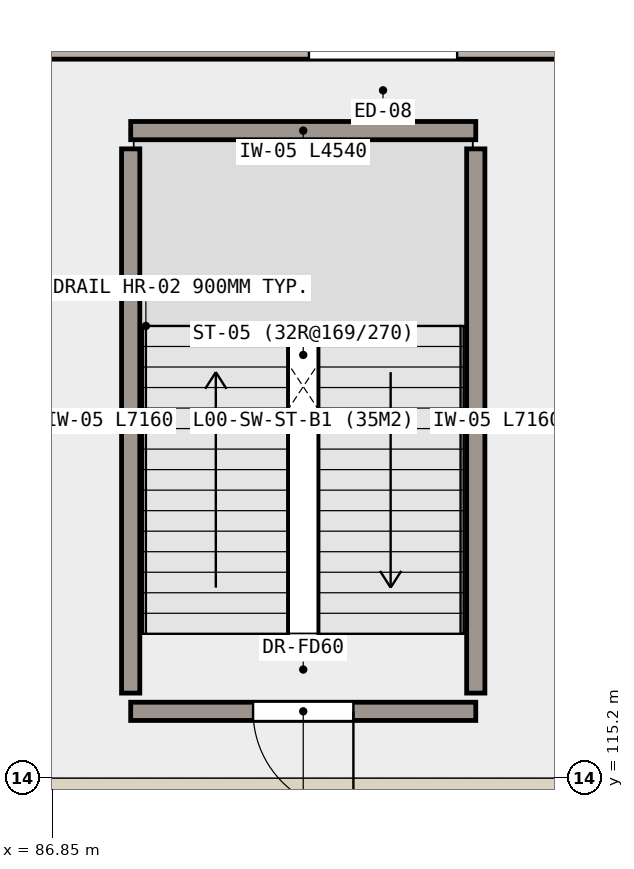
"""IFC4 building model, lengths in metres.
Left out: names, types, materials, properties, quantities, classifications, styles, units other than length and angle.
Written with IfcOpenShell. Run it as: python <this file> out.ifc"""

import sys

from ifc_helpers import new_model, si_unit, direction, frame, frame_2d, origin, place, context, subcontext, project, spatial, rectangle, extrude, element, fill, save


model = new_model("IFC4")
c1 = context("Model", 3, precision=1e-05, world=origin(), true_north=direction((0.0, 1.0)))
c2 = subcontext(c1, "Body", "Model", "MODEL_VIEW")
j1 = project(units=[si_unit("LENGTHUNIT", "METRE"), si_unit("PLANEANGLEUNIT", "RADIAN")], contexts=[c1])
p1 = place(None, origin())
s1 = spatial("IfcSite", under=j1, at=p1, CompositionType="ELEMENT")
p2 = place(p1, origin())
s2 = spatial("IfcBuilding", under=s1, at=p2, CompositionType="ELEMENT")
p3 = place(p2, origin())
s3 = spatial("IfcBuildingStorey", under=s2, at=p3, CompositionType="ELEMENT", Elevation=0.0)
p4 = place(p3, frame((86.65, 124.8, 0.0), z_axis=(0.0, 0.0, 1.0), x_axis=(1.0, 0.0, 0.0)))
e1 = element("IfcWall", 1, at=p4, inside=s3, PredefinedType="SOLIDWALL", context=c2, shape_type="SweptSolid", body=[
    extrude(rectangle(XDim=9.1, YDim=0.28, at=frame_2d((4.55, 0.0))), origin(), (0.0, 0.0, 1.0), 4.29),
])
p5 = place(p4, frame((3.575, 0.0, 0.0)))
e2 = element("IfcOpeningElement", 2, at=p5, cuts=e1, PredefinedType="OPENING", context=c2, shape_type="SweptSolid", body=[
    extrude(rectangle(XDim=1.95, YDim=2.4, at=frame_2d((0.975, 1.2))), frame((0.0, 0.15, 0.0), z_axis=(0.0, -1.0, 0.0), x_axis=(1.0, 0.0, 0.0)), (0.0, 0.0, 1.0), 0.3),
])
p6 = place(p3, frame((92.42, 116.08, 0.0), z_axis=(0.0, 0.0, 1.0), x_axis=(-1.0, 0.0, 0.0)))
e3 = element("IfcWall", 3, at=p6, inside=s3, PredefinedType="SHEAR", context=c2, shape_type="SweptSolid", body=[
    extrude(rectangle(XDim=4.54, YDim=0.24, at=frame_2d((2.27, 0.0))), origin(), (0.0, 0.0, 1.0), 5.12),
])
p7 = place(p6, frame((1.61, 0.0, 0.0)))
e4 = element("IfcOpeningElement", 4, at=p7, cuts=e3, PredefinedType="OPENING", context=c2, shape_type="SweptSolid", body=[
    extrude(rectangle(XDim=1.32, YDim=2.15, at=frame_2d((0.66, 1.075))), frame((0.0, 0.13, 0.0), z_axis=(0.0, -1.0, 0.0), x_axis=(1.0, 0.0, 0.0)), (0.0, 0.0, 1.0), 0.26),
])
p8 = place(p3, frame((87.88, 123.72, 0.0), z_axis=(0.0, 0.0, 1.0), x_axis=(1.0, 0.0, 0.0)))
e5 = element("IfcWall", 5, at=p8, inside=s3, PredefinedType="SHEAR", context=c2, shape_type="SweptSolid", body=[
    extrude(rectangle(XDim=4.54, YDim=0.24, at=frame_2d((2.27, 0.0))), origin(), (0.0, 0.0, 1.0), 5.12),
])
for number, where, z_axis, x_axis in (
    (6, (87.88, 116.32, 0.0), (0.0, 0.0, 1.0), (0.0, 1.0, 0.0)),
    (7, (92.42, 123.48, 0.0), (0.0, 0.0, 1.0), (0.0, -1.0, 0.0)),
):
    element("IfcWall", number, at=place(p3, frame(where, z_axis=z_axis, x_axis=x_axis)), inside=s3, PredefinedType="SHEAR", context=c2, shape_type="SweptSolid", body=[
        extrude(rectangle(XDim=7.16, YDim=0.24, at=frame_2d((3.58, 0.0))), origin(), (0.0, 0.0, 1.0), 5.12),
    ])
p9 = place(p7, origin())
e8 = element("IfcDoor", 8, at=p9, inside=s3, OperationType="SINGLE_SWING_LEFT", PredefinedType="DOOR", context=c2, shape_type="SweptSolid", body=[
    extrude(rectangle(XDim=1.32, YDim=2.15, at=frame_2d((0.66, 1.075))), frame((0.0, 0.025, 0.0), z_axis=(0.0, -1.0, 0.0), x_axis=(1.0, 0.0, 0.0)), (0.0, 0.0, 1.0), 0.05),
])
fill(e4, e8)
save(model, sys.argv[1])
